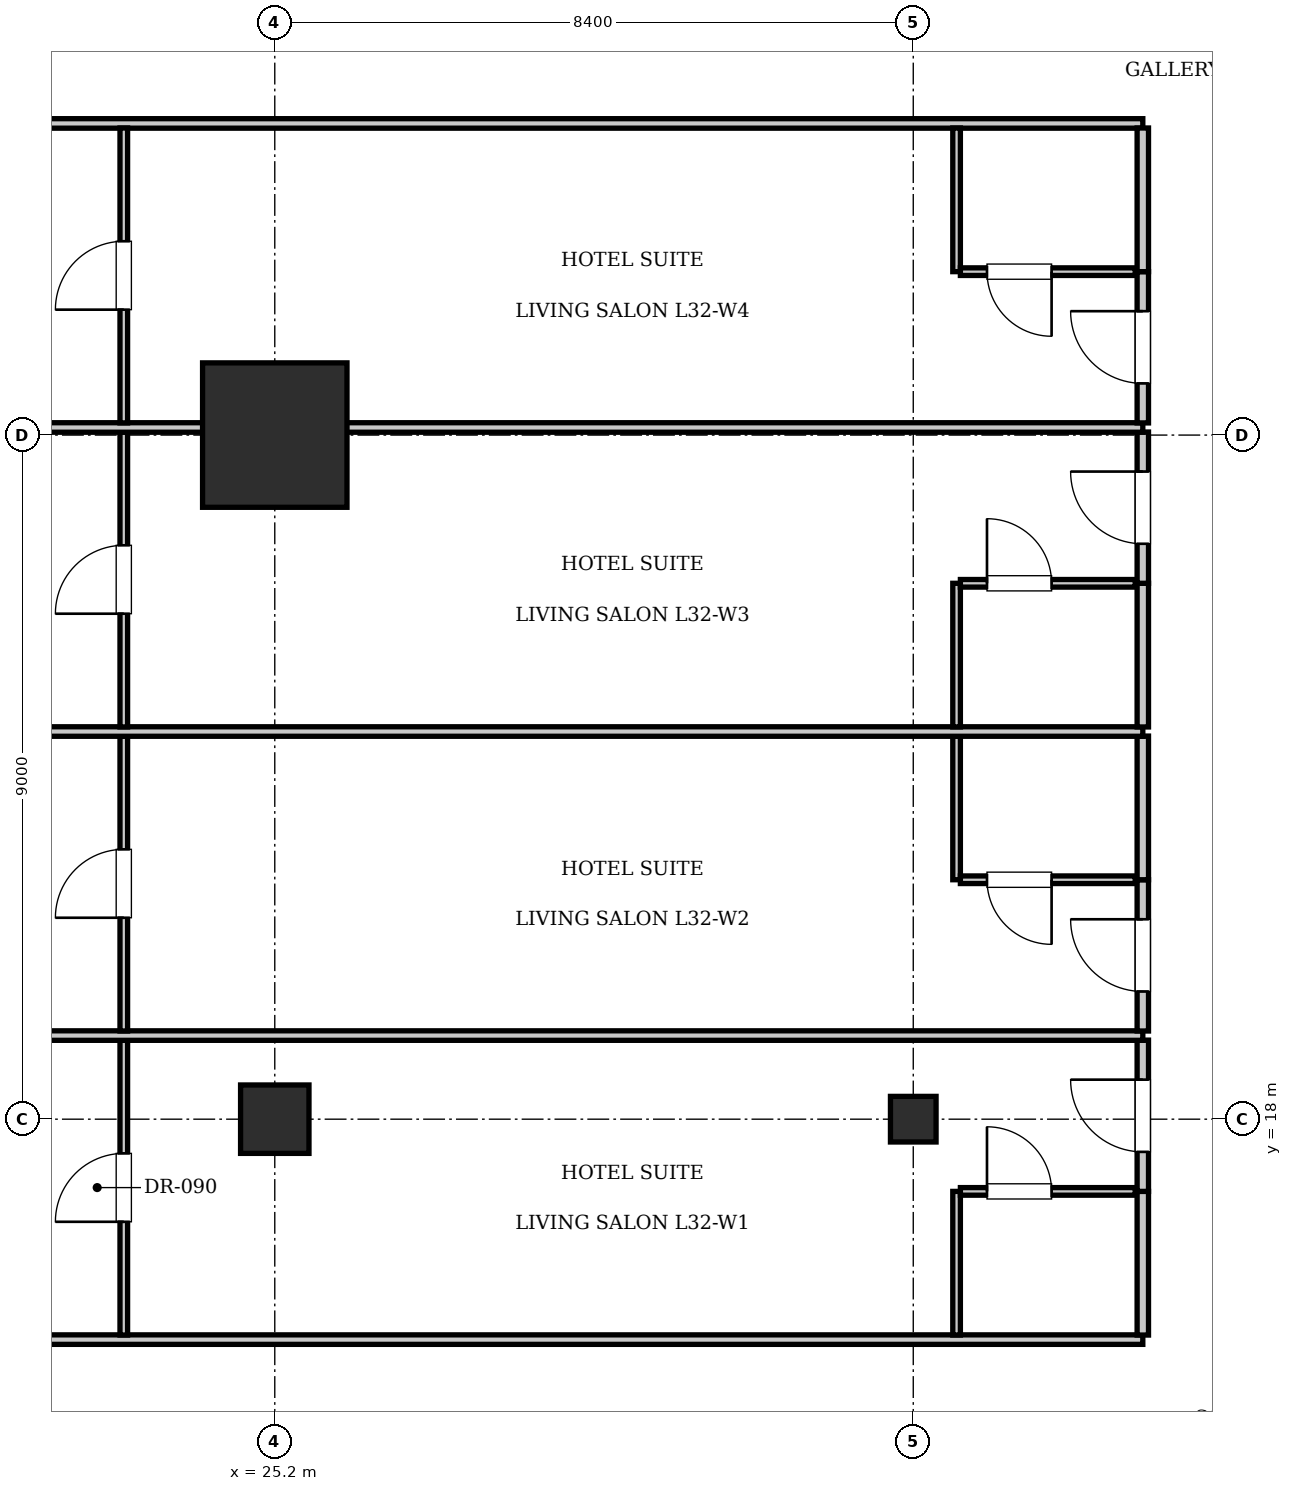
"""IFC4 building model, lengths in metres.
Left out: names, types, materials, properties, quantities, classifications, styles, units other than length and angle.
Written with IfcOpenShell. Run it as: python <this file> out.ifc"""

import sys

from ifc_helpers import new_model, si_unit, direction, frame, frame_2d, origin, origin_2d, place, context, subcontext, project, spatial, rectangle, i_section, extrude, element, fill, save


model = new_model("IFC4")
c1 = context("Model", 3, precision=1e-05, world=origin(), true_north=direction((0.0, 1.0)))
c2 = subcontext(c1, "Body", "Model", "MODEL_VIEW")
j1 = project(units=[si_unit("LENGTHUNIT", "METRE"), si_unit("PLANEANGLEUNIT", "RADIAN")], contexts=[c1])
p1 = place(None, origin())
s1 = spatial("IfcSite", under=j1, at=p1, CompositionType="ELEMENT")
p2 = place(p1, origin())
s2 = spatial("IfcBuilding", under=s1, at=p2, CompositionType="ELEMENT")
p3 = place(p2, frame((0.0, 0.0, 135.1)))
s3 = spatial("IfcBuildingStorey", under=s2, at=p3, CompositionType="ELEMENT", Elevation=135.1)
p4 = place(p3, frame((25.2, 27.0, 0.0), z_axis=(0.0, 0.0, 1.0), x_axis=(1.0, 0.0, 0.0)))
e1 = element("IfcColumn", 1, at=p4, inside=s3, PredefinedType="COLUMN", context=c2, shape_type="SweptSolid", body=[
    extrude(rectangle(XDim=1.9, YDim=1.9, at=origin_2d()), origin(), (0.0, 0.0, 1.0), 3.85),
])
p5 = place(p3, frame((25.2, 18.0, 0.0), z_axis=(0.0, 0.0, 1.0), x_axis=(1.0, 0.0, 0.0)))
e2 = element("IfcColumn", 2, at=p5, inside=s3, PredefinedType="COLUMN", context=c2, shape_type="SweptSolid", body=[
    extrude(rectangle(XDim=0.9, YDim=0.9, at=origin_2d()), origin(), (0.0, 0.0, 1.0), 3.85),
])
p6 = place(p3, frame((33.6, 18.0, 0.0), z_axis=(0.0, 0.0, 1.0), x_axis=(1.0, 0.0, 0.0)))
e3 = element("IfcColumn", 3, at=p6, inside=s3, PredefinedType="COLUMN", context=c2, shape_type="SweptSolid", body=[
    extrude(i_section(OverallWidth=0.6, OverallDepth=0.6, WebThickness=0.025, FlangeThickness=0.038, at=origin_2d()), origin(), (0.0, 0.0, 1.0), 3.85),
])
for number, where, z_axis, x_axis in (
    (4, (13.2, 15.1, 0.0), (0.0, 0.0, 1.0), (1.0, 0.0, 0.0)),
    (5, (13.2, 31.1, 0.0), (0.0, 0.0, 1.0), (1.0, 0.0, 0.0)),
):
    element("IfcWall", number, at=place(p3, frame(where, z_axis=z_axis, x_axis=x_axis)), inside=s3, PredefinedType="PARTITIONING", context=c2, shape_type="SweptSolid", body=[
        extrude(rectangle(XDim=23.42, YDim=0.125, at=frame_2d((11.71, 0.0))), origin(), (0.0, 0.0, 1.0), 3.61),
    ])
p7 = place(p3, frame((36.62, 15.16, 0.0), z_axis=(0.0, 0.0, 1.0), x_axis=(0.0, 1.0, 0.0)))
e6 = element("IfcWall", 6, at=p7, inside=s3, PredefinedType="PARTITIONING", context=c2, shape_type="SweptSolid", body=[
    extrude(rectangle(XDim=1.89, YDim=0.15, at=frame_2d((0.945, 0.0))), origin(), (0.0, 0.0, 1.0), 3.61),
])
p8 = place(p3, frame((36.62, 17.05, 0.0), z_axis=(0.0, 0.0, 1.0), x_axis=(0.0, 1.0, 0.0)))
e7 = element("IfcWall", 7, at=p8, inside=s3, PredefinedType="PARTITIONING", context=c2, shape_type="SweptSolid", body=[
    extrude(rectangle(XDim=1.99, YDim=0.15, at=frame_2d((0.995, 0.0))), origin(), (0.0, 0.0, 1.0), 3.61),
])
p9 = place(p8, frame((0.52, 0.0, 0.0)))
e8 = element("IfcOpeningElement", 8, at=p9, cuts=e7, PredefinedType="OPENING", context=c2, shape_type="SweptSolid", body=[
    extrude(rectangle(XDim=0.95, YDim=2.15, at=frame_2d((0.475, 1.075))), frame((0.0, 0.085, 0.0), z_axis=(0.0, -1.0, 0.0), x_axis=(1.0, 0.0, 0.0)), (0.0, 0.0, 1.0), 0.17),
])
p10 = place(p3, frame((34.17, 15.16, 0.0), z_axis=(0.0, 0.0, 1.0), x_axis=(0.0, 1.0, 0.0)))
e9 = element("IfcWall", 9, at=p10, inside=s3, PredefinedType="PARTITIONING", context=c2, shape_type="SweptSolid", body=[
    extrude(rectangle(XDim=1.89, YDim=0.1, at=frame_2d((0.945, 0.0))), origin(), (0.0, 0.0, 1.0), 3.61),
])
p11 = place(p3, frame((34.22, 17.05, 0.0), z_axis=(0.0, 0.0, 1.0), x_axis=(1.0, 0.0, 0.0)))
e10 = element("IfcWall", 10, at=p11, inside=s3, PredefinedType="PARTITIONING", context=c2, shape_type="SweptSolid", body=[
    extrude(rectangle(XDim=2.3, YDim=0.1, at=frame_2d((1.15, 0.0))), origin(), (0.0, 0.0, 1.0), 3.61),
])
p12 = place(p11, frame((0.35, 0.0, 0.0)))
e11 = element("IfcOpeningElement", 11, at=p12, cuts=e10, PredefinedType="OPENING", context=c2, shape_type="SweptSolid", body=[
    extrude(rectangle(XDim=0.85, YDim=2.1, at=frame_2d((0.425, 1.05))), frame((0.0, 0.06, 0.0), z_axis=(0.0, -1.0, 0.0), x_axis=(1.0, 0.0, 0.0)), (0.0, 0.0, 1.0), 0.12),
])
p13 = place(p3, frame((23.214, 15.16, 0.0), z_axis=(0.0, 0.0, 1.0), x_axis=(0.0, 1.0, 0.0)))
e12 = element("IfcWall", 12, at=p13, inside=s3, PredefinedType="PARTITIONING", context=c2, shape_type="SweptSolid", body=[
    extrude(rectangle(XDim=3.88, YDim=0.1, at=frame_2d((1.94, 0.0))), origin(), (0.0, 0.0, 1.0), 3.61),
])
p14 = place(p13, frame((1.49, 0.0, 0.0)))
e13 = element("IfcOpeningElement", 13, at=p14, cuts=e12, PredefinedType="OPENING", context=c2, shape_type="SweptSolid", body=[
    extrude(rectangle(XDim=0.9, YDim=2.1, at=frame_2d((0.45, 1.05))), frame((0.0, 0.06, 0.0), z_axis=(0.0, -1.0, 0.0), x_axis=(1.0, 0.0, 0.0)), (0.0, 0.0, 1.0), 0.12),
])
p15 = place(p3, frame((13.2, 19.1, 0.0), z_axis=(0.0, 0.0, 1.0), x_axis=(1.0, 0.0, 0.0)))
e14 = element("IfcWall", 14, at=p15, inside=s3, PredefinedType="PARTITIONING", context=c2, shape_type="SweptSolid", body=[
    extrude(rectangle(XDim=23.42, YDim=0.125, at=frame_2d((11.71, 0.0))), origin(), (0.0, 0.0, 1.0), 3.61),
])
p16 = place(p3, frame((36.62, 19.16, 0.0), z_axis=(0.0, 0.0, 1.0), x_axis=(0.0, 1.0, 0.0)))
e15 = element("IfcWall", 15, at=p16, inside=s3, PredefinedType="PARTITIONING", context=c2, shape_type="SweptSolid", body=[
    extrude(rectangle(XDim=1.99, YDim=0.15, at=frame_2d((0.995, 0.0))), origin(), (0.0, 0.0, 1.0), 3.61),
])
p17 = place(p16, frame((0.52, 0.0, 0.0)))
e16 = element("IfcOpeningElement", 16, at=p17, cuts=e15, PredefinedType="OPENING", context=c2, shape_type="SweptSolid", body=[
    extrude(rectangle(XDim=0.95, YDim=2.15, at=frame_2d((0.475, 1.075))), frame((0.0, 0.085, 0.0), z_axis=(0.0, -1.0, 0.0), x_axis=(1.0, 0.0, 0.0)), (0.0, 0.0, 1.0), 0.17),
])
p18 = place(p3, frame((36.62, 21.15, 0.0), z_axis=(0.0, 0.0, 1.0), x_axis=(0.0, 1.0, 0.0)))
e17 = element("IfcWall", 17, at=p18, inside=s3, PredefinedType="PARTITIONING", context=c2, shape_type="SweptSolid", body=[
    extrude(rectangle(XDim=1.89, YDim=0.15, at=frame_2d((0.945, 0.0))), origin(), (0.0, 0.0, 1.0), 3.61),
])
p19 = place(p3, frame((34.17, 21.15, 0.0), z_axis=(0.0, 0.0, 1.0), x_axis=(0.0, 1.0, 0.0)))
e18 = element("IfcWall", 18, at=p19, inside=s3, PredefinedType="PARTITIONING", context=c2, shape_type="SweptSolid", body=[
    extrude(rectangle(XDim=1.89, YDim=0.1, at=frame_2d((0.945, 0.0))), origin(), (0.0, 0.0, 1.0), 3.61),
])
p20 = place(p3, frame((34.22, 21.15, 0.0), z_axis=(0.0, 0.0, 1.0), x_axis=(1.0, 0.0, 0.0)))
e19 = element("IfcWall", 19, at=p20, inside=s3, PredefinedType="PARTITIONING", context=c2, shape_type="SweptSolid", body=[
    extrude(rectangle(XDim=2.3, YDim=0.1, at=frame_2d((1.15, 0.0))), origin(), (0.0, 0.0, 1.0), 3.61),
])
p21 = place(p20, frame((0.35, 0.0, 0.0)))
e20 = element("IfcOpeningElement", 20, at=p21, cuts=e19, PredefinedType="OPENING", context=c2, shape_type="SweptSolid", body=[
    extrude(rectangle(XDim=0.85, YDim=2.1, at=frame_2d((0.425, 1.05))), frame((0.0, 0.06, 0.0), z_axis=(0.0, -1.0, 0.0), x_axis=(1.0, 0.0, 0.0)), (0.0, 0.0, 1.0), 0.12),
])
p22 = place(p3, frame((23.214, 19.16, 0.0), z_axis=(0.0, 0.0, 1.0), x_axis=(0.0, 1.0, 0.0)))
e21 = element("IfcWall", 21, at=p22, inside=s3, PredefinedType="PARTITIONING", context=c2, shape_type="SweptSolid", body=[
    extrude(rectangle(XDim=3.88, YDim=0.1, at=frame_2d((1.94, 0.0))), origin(), (0.0, 0.0, 1.0), 3.61),
])
p23 = place(p22, frame((1.49, 0.0, 0.0)))
e22 = element("IfcOpeningElement", 22, at=p23, cuts=e21, PredefinedType="OPENING", context=c2, shape_type="SweptSolid", body=[
    extrude(rectangle(XDim=0.9, YDim=2.1, at=frame_2d((0.45, 1.05))), frame((0.0, 0.06, 0.0), z_axis=(0.0, -1.0, 0.0), x_axis=(1.0, 0.0, 0.0)), (0.0, 0.0, 1.0), 0.12),
])
p24 = place(p3, frame((13.2, 23.1, 0.0), z_axis=(0.0, 0.0, 1.0), x_axis=(1.0, 0.0, 0.0)))
e23 = element("IfcWall", 23, at=p24, inside=s3, PredefinedType="PARTITIONING", context=c2, shape_type="SweptSolid", body=[
    extrude(rectangle(XDim=23.42, YDim=0.125, at=frame_2d((11.71, 0.0))), origin(), (0.0, 0.0, 1.0), 3.61),
])
p25 = place(p3, frame((36.62, 23.16, 0.0), z_axis=(0.0, 0.0, 1.0), x_axis=(0.0, 1.0, 0.0)))
e24 = element("IfcWall", 24, at=p25, inside=s3, PredefinedType="PARTITIONING", context=c2, shape_type="SweptSolid", body=[
    extrude(rectangle(XDim=1.89, YDim=0.15, at=frame_2d((0.945, 0.0))), origin(), (0.0, 0.0, 1.0), 3.61),
])
p26 = place(p3, frame((36.62, 25.05, 0.0), z_axis=(0.0, 0.0, 1.0), x_axis=(0.0, 1.0, 0.0)))
e25 = element("IfcWall", 25, at=p26, inside=s3, PredefinedType="PARTITIONING", context=c2, shape_type="SweptSolid", body=[
    extrude(rectangle(XDim=1.99, YDim=0.15, at=frame_2d((0.995, 0.0))), origin(), (0.0, 0.0, 1.0), 3.61),
])
p27 = place(p26, frame((0.52, 0.0, 0.0)))
e26 = element("IfcOpeningElement", 26, at=p27, cuts=e25, PredefinedType="OPENING", context=c2, shape_type="SweptSolid", body=[
    extrude(rectangle(XDim=0.95, YDim=2.15, at=frame_2d((0.475, 1.075))), frame((0.0, 0.085, 0.0), z_axis=(0.0, -1.0, 0.0), x_axis=(1.0, 0.0, 0.0)), (0.0, 0.0, 1.0), 0.17),
])
p28 = place(p3, frame((34.17, 23.16, 0.0), z_axis=(0.0, 0.0, 1.0), x_axis=(0.0, 1.0, 0.0)))
e27 = element("IfcWall", 27, at=p28, inside=s3, PredefinedType="PARTITIONING", context=c2, shape_type="SweptSolid", body=[
    extrude(rectangle(XDim=1.89, YDim=0.1, at=frame_2d((0.945, 0.0))), origin(), (0.0, 0.0, 1.0), 3.61),
])
p29 = place(p3, frame((34.22, 25.05, 0.0), z_axis=(0.0, 0.0, 1.0), x_axis=(1.0, 0.0, 0.0)))
e28 = element("IfcWall", 28, at=p29, inside=s3, PredefinedType="PARTITIONING", context=c2, shape_type="SweptSolid", body=[
    extrude(rectangle(XDim=2.3, YDim=0.1, at=frame_2d((1.15, 0.0))), origin(), (0.0, 0.0, 1.0), 3.61),
])
p30 = place(p29, frame((0.35, 0.0, 0.0)))
e29 = element("IfcOpeningElement", 29, at=p30, cuts=e28, PredefinedType="OPENING", context=c2, shape_type="SweptSolid", body=[
    extrude(rectangle(XDim=0.85, YDim=2.1, at=frame_2d((0.425, 1.05))), frame((0.0, 0.06, 0.0), z_axis=(0.0, -1.0, 0.0), x_axis=(1.0, 0.0, 0.0)), (0.0, 0.0, 1.0), 0.12),
])
p31 = place(p3, frame((23.214, 23.16, 0.0), z_axis=(0.0, 0.0, 1.0), x_axis=(0.0, 1.0, 0.0)))
e30 = element("IfcWall", 30, at=p31, inside=s3, PredefinedType="PARTITIONING", context=c2, shape_type="SweptSolid", body=[
    extrude(rectangle(XDim=3.88, YDim=0.1, at=frame_2d((1.94, 0.0))), origin(), (0.0, 0.0, 1.0), 3.61),
])
p32 = place(p31, frame((1.49, 0.0, 0.0)))
e31 = element("IfcOpeningElement", 31, at=p32, cuts=e30, PredefinedType="OPENING", context=c2, shape_type="SweptSolid", body=[
    extrude(rectangle(XDim=0.9, YDim=2.1, at=frame_2d((0.45, 1.05))), frame((0.0, 0.06, 0.0), z_axis=(0.0, -1.0, 0.0), x_axis=(1.0, 0.0, 0.0)), (0.0, 0.0, 1.0), 0.12),
])
p33 = place(p3, frame((13.2, 27.1, 0.0), z_axis=(0.0, 0.0, 1.0), x_axis=(1.0, 0.0, 0.0)))
e32 = element("IfcWall", 32, at=p33, inside=s3, PredefinedType="PARTITIONING", context=c2, shape_type="SweptSolid", body=[
    extrude(rectangle(XDim=23.42, YDim=0.125, at=frame_2d((11.71, 0.0))), origin(), (0.0, 0.0, 1.0), 2.41),
])
p34 = place(p3, frame((36.62, 27.16, 0.0), z_axis=(0.0, 0.0, 1.0), x_axis=(0.0, 1.0, 0.0)))
e33 = element("IfcWall", 33, at=p34, inside=s3, PredefinedType="PARTITIONING", context=c2, shape_type="SweptSolid", body=[
    extrude(rectangle(XDim=1.99, YDim=0.15, at=frame_2d((0.995, 0.0))), origin(), (0.0, 0.0, 1.0), 3.61),
])
p35 = place(p34, frame((0.52, 0.0, 0.0)))
e34 = element("IfcOpeningElement", 34, at=p35, cuts=e33, PredefinedType="OPENING", context=c2, shape_type="SweptSolid", body=[
    extrude(rectangle(XDim=0.95, YDim=2.15, at=frame_2d((0.475, 1.075))), frame((0.0, 0.085, 0.0), z_axis=(0.0, -1.0, 0.0), x_axis=(1.0, 0.0, 0.0)), (0.0, 0.0, 1.0), 0.17),
])
p36 = place(p3, frame((36.62, 29.15, 0.0), z_axis=(0.0, 0.0, 1.0), x_axis=(0.0, 1.0, 0.0)))
e35 = element("IfcWall", 35, at=p36, inside=s3, PredefinedType="PARTITIONING", context=c2, shape_type="SweptSolid", body=[
    extrude(rectangle(XDim=1.89, YDim=0.15, at=frame_2d((0.945, 0.0))), origin(), (0.0, 0.0, 1.0), 3.61),
])
p37 = place(p3, frame((34.17, 29.15, 0.0), z_axis=(0.0, 0.0, 1.0), x_axis=(0.0, 1.0, 0.0)))
e36 = element("IfcWall", 36, at=p37, inside=s3, PredefinedType="PARTITIONING", context=c2, shape_type="SweptSolid", body=[
    extrude(rectangle(XDim=1.89, YDim=0.1, at=frame_2d((0.945, 0.0))), origin(), (0.0, 0.0, 1.0), 3.61),
])
p38 = place(p3, frame((34.22, 29.15, 0.0), z_axis=(0.0, 0.0, 1.0), x_axis=(1.0, 0.0, 0.0)))
e37 = element("IfcWall", 37, at=p38, inside=s3, PredefinedType="PARTITIONING", context=c2, shape_type="SweptSolid", body=[
    extrude(rectangle(XDim=2.3, YDim=0.1, at=frame_2d((1.15, 0.0))), origin(), (0.0, 0.0, 1.0), 3.61),
])
p39 = place(p38, frame((0.35, 0.0, 0.0)))
e38 = element("IfcOpeningElement", 38, at=p39, cuts=e37, PredefinedType="OPENING", context=c2, shape_type="SweptSolid", body=[
    extrude(rectangle(XDim=0.85, YDim=2.1, at=frame_2d((0.425, 1.05))), frame((0.0, 0.06, 0.0), z_axis=(0.0, -1.0, 0.0), x_axis=(1.0, 0.0, 0.0)), (0.0, 0.0, 1.0), 0.12),
])
p40 = place(p3, frame((23.214, 27.16, 0.0), z_axis=(0.0, 0.0, 1.0), x_axis=(0.0, 1.0, 0.0)))
e39 = element("IfcWall", 39, at=p40, inside=s3, PredefinedType="PARTITIONING", context=c2, shape_type="SweptSolid", body=[
    extrude(rectangle(XDim=3.88, YDim=0.1, at=frame_2d((1.94, 0.0))), origin(), (0.0, 0.0, 1.0), 3.61),
])
p41 = place(p40, frame((1.49, 0.0, 0.0)))
e40 = element("IfcOpeningElement", 40, at=p41, cuts=e39, PredefinedType="OPENING", context=c2, shape_type="SweptSolid", body=[
    extrude(rectangle(XDim=0.9, YDim=2.1, at=frame_2d((0.45, 1.05))), frame((0.0, 0.06, 0.0), z_axis=(0.0, -1.0, 0.0), x_axis=(1.0, 0.0, 0.0)), (0.0, 0.0, 1.0), 0.12),
])
p42 = place(p12, origin())
e41 = element("IfcDoor", 41, at=p42, inside=s3, OperationType="SINGLE_SWING_LEFT", PredefinedType="DOOR", context=c2, shape_type="SweptSolid", body=[
    extrude(rectangle(XDim=0.85, YDim=2.1, at=frame_2d((0.425, 1.05))), frame((0.0, 0.025, 0.0), z_axis=(0.0, -1.0, 0.0), x_axis=(1.0, 0.0, 0.0)), (0.0, 0.0, 1.0), 0.05),
])
fill(e11, e41)
p43 = place(p9, origin())
e42 = element("IfcDoor", 42, at=p43, inside=s3, OperationType="SINGLE_SWING_RIGHT", PredefinedType="DOOR", context=c2, shape_type="SweptSolid", body=[
    extrude(rectangle(XDim=0.95, YDim=2.15, at=frame_2d((0.475, 1.075))), frame((0.0, 0.025, 0.0), z_axis=(0.0, -1.0, 0.0), x_axis=(1.0, 0.0, 0.0)), (0.0, 0.0, 1.0), 0.05),
])
fill(e8, e42)
p44 = place(p14, origin())
e43 = element("IfcDoor", 43, at=p44, inside=s3, OperationType="SINGLE_SWING_LEFT", PredefinedType="DOOR", context=c2, shape_type="SweptSolid", body=[
    extrude(rectangle(XDim=0.9, YDim=2.1, at=frame_2d((0.45, 1.05))), frame((0.0, 0.025, 0.0), z_axis=(0.0, -1.0, 0.0), x_axis=(1.0, 0.0, 0.0)), (0.0, 0.0, 1.0), 0.05),
])
fill(e13, e43)
p45 = place(p21, frame((0.85, 0.0, 0.0), z_axis=(0.0, 0.0, 1.0), x_axis=(-1.0, 0.0, 0.0)))
e44 = element("IfcDoor", 44, at=p45, inside=s3, OperationType="SINGLE_SWING_LEFT", PredefinedType="DOOR", context=c2, shape_type="SweptSolid", body=[
    extrude(rectangle(XDim=0.85, YDim=2.1, at=frame_2d((0.425, 1.05))), frame((0.0, 0.025, 0.0), z_axis=(0.0, -1.0, 0.0), x_axis=(1.0, 0.0, 0.0)), (0.0, 0.0, 1.0), 0.05),
])
fill(e20, e44)
p46 = place(p17, origin())
e45 = element("IfcDoor", 45, at=p46, inside=s3, OperationType="SINGLE_SWING_RIGHT", PredefinedType="DOOR", context=c2, shape_type="SweptSolid", body=[
    extrude(rectangle(XDim=0.95, YDim=2.15, at=frame_2d((0.475, 1.075))), frame((0.0, 0.025, 0.0), z_axis=(0.0, -1.0, 0.0), x_axis=(1.0, 0.0, 0.0)), (0.0, 0.0, 1.0), 0.05),
])
fill(e16, e45)
p47 = place(p23, origin())
e46 = element("IfcDoor", 46, at=p47, inside=s3, OperationType="SINGLE_SWING_LEFT", PredefinedType="DOOR", context=c2, shape_type="SweptSolid", body=[
    extrude(rectangle(XDim=0.9, YDim=2.1, at=frame_2d((0.45, 1.05))), frame((0.0, 0.025, 0.0), z_axis=(0.0, -1.0, 0.0), x_axis=(1.0, 0.0, 0.0)), (0.0, 0.0, 1.0), 0.05),
])
fill(e22, e46)
p48 = place(p30, origin())
e47 = element("IfcDoor", 47, at=p48, inside=s3, OperationType="SINGLE_SWING_LEFT", PredefinedType="DOOR", context=c2, shape_type="SweptSolid", body=[
    extrude(rectangle(XDim=0.85, YDim=2.1, at=frame_2d((0.425, 1.05))), frame((0.0, 0.025, 0.0), z_axis=(0.0, -1.0, 0.0), x_axis=(1.0, 0.0, 0.0)), (0.0, 0.0, 1.0), 0.05),
])
fill(e29, e47)
p49 = place(p27, origin())
e48 = element("IfcDoor", 48, at=p49, inside=s3, OperationType="SINGLE_SWING_RIGHT", PredefinedType="DOOR", context=c2, shape_type="SweptSolid", body=[
    extrude(rectangle(XDim=0.95, YDim=2.15, at=frame_2d((0.475, 1.075))), frame((0.0, 0.025, 0.0), z_axis=(0.0, -1.0, 0.0), x_axis=(1.0, 0.0, 0.0)), (0.0, 0.0, 1.0), 0.05),
])
fill(e26, e48)
p50 = place(p32, origin())
e49 = element("IfcDoor", 49, at=p50, inside=s3, OperationType="SINGLE_SWING_LEFT", PredefinedType="DOOR", context=c2, shape_type="SweptSolid", body=[
    extrude(rectangle(XDim=0.9, YDim=2.1, at=frame_2d((0.45, 1.05))), frame((0.0, 0.025, 0.0), z_axis=(0.0, -1.0, 0.0), x_axis=(1.0, 0.0, 0.0)), (0.0, 0.0, 1.0), 0.05),
])
fill(e31, e49)
p51 = place(p39, frame((0.85, 0.0, 0.0), z_axis=(0.0, 0.0, 1.0), x_axis=(-1.0, 0.0, 0.0)))
e50 = element("IfcDoor", 50, at=p51, inside=s3, OperationType="SINGLE_SWING_LEFT", PredefinedType="DOOR", context=c2, shape_type="SweptSolid", body=[
    extrude(rectangle(XDim=0.85, YDim=2.1, at=frame_2d((0.425, 1.05))), frame((0.0, 0.025, 0.0), z_axis=(0.0, -1.0, 0.0), x_axis=(1.0, 0.0, 0.0)), (0.0, 0.0, 1.0), 0.05),
])
fill(e38, e50)
p52 = place(p35, origin())
e51 = element("IfcDoor", 51, at=p52, inside=s3, OperationType="SINGLE_SWING_RIGHT", PredefinedType="DOOR", context=c2, shape_type="SweptSolid", body=[
    extrude(rectangle(XDim=0.95, YDim=2.15, at=frame_2d((0.475, 1.075))), frame((0.0, 0.025, 0.0), z_axis=(0.0, -1.0, 0.0), x_axis=(1.0, 0.0, 0.0)), (0.0, 0.0, 1.0), 0.05),
])
fill(e34, e51)
p53 = place(p41, origin())
e52 = element("IfcDoor", 52, at=p53, inside=s3, OperationType="SINGLE_SWING_LEFT", PredefinedType="DOOR", context=c2, shape_type="SweptSolid", body=[
    extrude(rectangle(XDim=0.9, YDim=2.1, at=frame_2d((0.45, 1.05))), frame((0.0, 0.025, 0.0), z_axis=(0.0, -1.0, 0.0), x_axis=(1.0, 0.0, 0.0)), (0.0, 0.0, 1.0), 0.05),
])
fill(e40, e52)
save(model, sys.argv[1])
